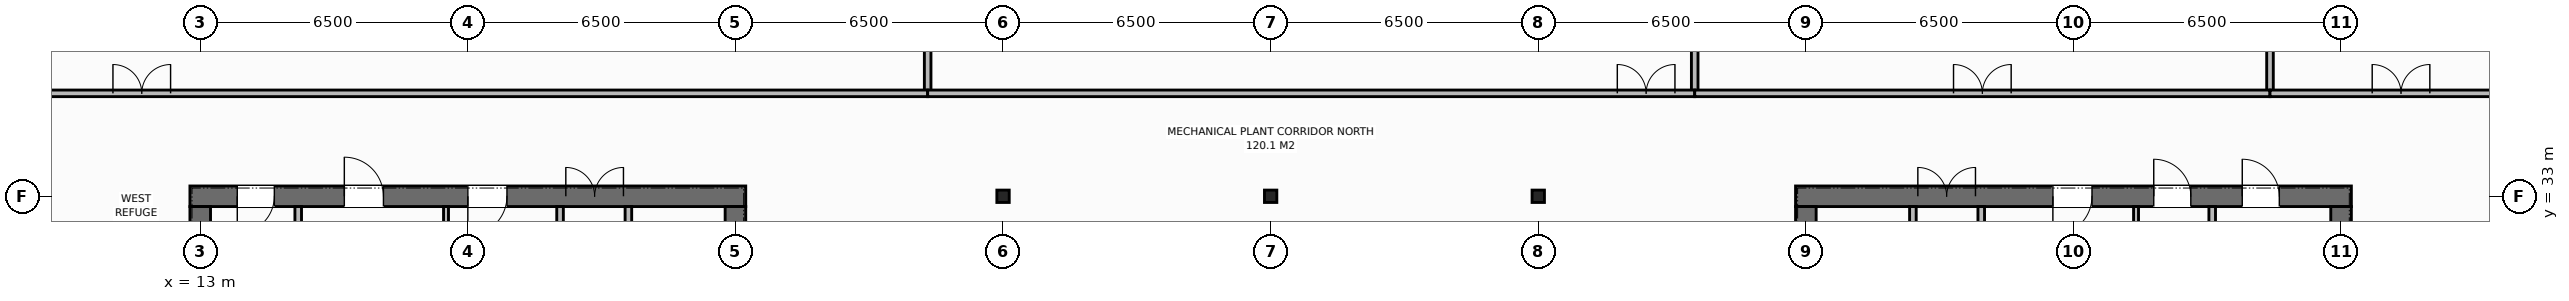
"""IFC4 building model, lengths in metres.
Left out: names, types, materials, properties, quantities, classifications, styles, units other than length and angle.
Written with IfcOpenShell. Run it as: python <this file> out.ifc"""

import sys

from ifc_helpers import new_model, si_unit, direction, frame, frame_2d, origin, origin_2d, place, context, subcontext, project, spatial, rectangle, i_section, extrude, element, fill, save


model = new_model("IFC4")
c1 = context("Model", 3, precision=1e-05, world=origin(), true_north=direction((0.0, 1.0)))
c2 = subcontext(c1, "Body", "Model", "MODEL_VIEW")
j1 = project(units=[si_unit("LENGTHUNIT", "METRE"), si_unit("PLANEANGLEUNIT", "RADIAN")], contexts=[c1])
p1 = place(None, origin())
s1 = spatial("IfcSite", under=j1, at=p1, CompositionType="ELEMENT")
p2 = place(p1, origin())
s2 = spatial("IfcBuilding", under=s1, at=p2, CompositionType="ELEMENT")
p3 = place(p2, frame((0.0, 0.0, 315.4)))
s3 = spatial("IfcBuildingStorey", under=s2, at=p3, CompositionType="ELEMENT", Elevation=315.4)
p4 = place(p3, frame((12.75, 33.0, 0.0), z_axis=(0.0, 0.0, 1.0), x_axis=(1.0, 0.0, 0.0)))
e1 = element("IfcWall", 1, at=p4, inside=s3, PredefinedType="SHEAR", context=c2, shape_type="SweptSolid", body=[
    extrude(rectangle(XDim=13.5, YDim=0.5, at=frame_2d((6.75, 0.0))), origin(), (0.0, 0.0, 1.0), 4.58),
])
p5 = place(p4, frame((1.15, 0.0, 0.0)))
e2 = element("IfcOpeningElement", 2, at=p5, cuts=e1, PredefinedType="OPENING", context=c2, shape_type="SweptSolid", body=[
    extrude(rectangle(XDim=0.9, YDim=2.15, at=frame_2d((0.45, 1.075))), frame((0.0, 0.26, 0.0), z_axis=(0.0, -1.0, 0.0), x_axis=(1.0, 0.0, 0.0)), (0.0, 0.0, 1.0), 0.52),
])
p6 = place(p4, frame((3.75, 0.0, 0.0)))
e3 = element("IfcOpeningElement", 3, at=p6, cuts=e1, PredefinedType="OPENING", context=c2, shape_type="SweptSolid", body=[
    extrude(rectangle(XDim=0.95, YDim=2.15, at=frame_2d((0.475, 1.075))), frame((0.0, 0.26, 0.0), z_axis=(0.0, -1.0, 0.0), x_axis=(1.0, 0.0, 0.0)), (0.0, 0.0, 1.0), 0.52),
])
p7 = place(p4, frame((6.75, 0.0, 0.0)))
e4 = element("IfcOpeningElement", 4, at=p7, cuts=e1, PredefinedType="OPENING", context=c2, shape_type="SweptSolid", body=[
    extrude(rectangle(XDim=0.95, YDim=2.15, at=frame_2d((0.475, 1.075))), frame((0.0, 0.26, 0.0), z_axis=(0.0, -1.0, 0.0), x_axis=(1.0, 0.0, 0.0)), (0.0, 0.0, 1.0), 0.52),
])
p8 = place(p4, frame((9.13, 0.0, 0.0)))
e5 = element("IfcOpeningElement", 5, at=p8, cuts=e1, PredefinedType="OPENING", context=c2, shape_type="SweptSolid", body=[
    extrude(rectangle(XDim=1.4, YDim=2.2, at=frame_2d((0.7, 1.1))), frame((0.0, 0.26, 0.0), z_axis=(0.0, -1.0, 0.0), x_axis=(1.0, 0.0, 0.0)), (0.0, 0.0, 1.0), 0.52),
])
p9 = place(p3, frame((13.0, 19.25, 0.0), z_axis=(0.0, 0.0, 1.0), x_axis=(0.0, 1.0, 0.0)))
e6 = element("IfcWall", 6, at=p9, inside=s3, PredefinedType="SHEAR", context=c2, shape_type="SweptSolid", body=[
    extrude(rectangle(XDim=13.5, YDim=0.5, at=frame_2d((6.75, 0.0))), origin(), (0.0, 0.0, 1.0), 4.58),
])
p10 = place(p9, frame((4.8, 0.0, 0.0)))
e7 = element("IfcOpeningElement", 7, at=p10, cuts=e6, PredefinedType="OPENING", context=c2, shape_type="SweptSolid", body=[
    extrude(rectangle(XDim=1.4, YDim=2.2, at=frame_2d((0.7, 1.1))), frame((0.0, 0.26, 0.0), z_axis=(0.0, -1.0, 0.0), x_axis=(1.0, 0.0, 0.0)), (0.0, 0.0, 1.0), 0.52),
])
p11 = place(p3, frame((26.0, 19.25, 0.0), z_axis=(0.0, 0.0, 1.0), x_axis=(0.0, 1.0, 0.0)))
e8 = element("IfcWall", 8, at=p11, inside=s3, PredefinedType="SHEAR", context=c2, shape_type="SweptSolid", body=[
    extrude(rectangle(XDim=13.5, YDim=0.5, at=frame_2d((6.75, 0.0))), origin(), (0.0, 0.0, 1.0), 4.58),
])
p12 = place(p3, frame((51.75, 33.0, 0.0), z_axis=(0.0, 0.0, 1.0), x_axis=(1.0, 0.0, 0.0)))
e9 = element("IfcWall", 9, at=p12, inside=s3, PredefinedType="SHEAR", context=c2, shape_type="SweptSolid", body=[
    extrude(rectangle(XDim=13.5, YDim=0.5, at=frame_2d((6.75, 0.0))), origin(), (0.0, 0.0, 1.0), 4.58),
])
p13 = place(p12, frame((2.97, 0.0, 0.0)))
e10 = element("IfcOpeningElement", 10, at=p13, cuts=e9, PredefinedType="OPENING", context=c2, shape_type="SweptSolid", body=[
    extrude(rectangle(XDim=1.4, YDim=2.2, at=frame_2d((0.7, 1.1))), frame((0.0, 0.26, 0.0), z_axis=(0.0, -1.0, 0.0), x_axis=(1.0, 0.0, 0.0)), (0.0, 0.0, 1.0), 0.52),
])
p14 = place(p12, frame((10.85, 0.0, 0.0)))
e11 = element("IfcOpeningElement", 11, at=p14, cuts=e9, PredefinedType="OPENING", context=c2, shape_type="SweptSolid", body=[
    extrude(rectangle(XDim=0.9, YDim=2.15, at=frame_2d((0.45, 1.075))), frame((0.0, 0.26, 0.0), z_axis=(0.0, -1.0, 0.0), x_axis=(1.0, 0.0, 0.0)), (0.0, 0.0, 1.0), 0.52),
])
p15 = place(p12, frame((6.25, 0.0, 0.0)))
e12 = element("IfcOpeningElement", 12, at=p15, cuts=e9, PredefinedType="OPENING", context=c2, shape_type="SweptSolid", body=[
    extrude(rectangle(XDim=0.95, YDim=2.15, at=frame_2d((0.475, 1.075))), frame((0.0, 0.26, 0.0), z_axis=(0.0, -1.0, 0.0), x_axis=(1.0, 0.0, 0.0)), (0.0, 0.0, 1.0), 0.52),
])
p16 = place(p12, frame((8.7, 0.0, 0.0)))
e13 = element("IfcOpeningElement", 13, at=p16, cuts=e9, PredefinedType="OPENING", context=c2, shape_type="SweptSolid", body=[
    extrude(rectangle(XDim=0.9, YDim=2.15, at=frame_2d((0.45, 1.075))), frame((0.0, 0.26, 0.0), z_axis=(0.0, -1.0, 0.0), x_axis=(1.0, 0.0, 0.0)), (0.0, 0.0, 1.0), 0.52),
])
p17 = place(p3, frame((52.0, 19.25, 0.0), z_axis=(0.0, 0.0, 1.0), x_axis=(0.0, 1.0, 0.0)))
e14 = element("IfcWall", 14, at=p17, inside=s3, PredefinedType="SHEAR", context=c2, shape_type="SweptSolid", body=[
    extrude(rectangle(XDim=13.5, YDim=0.5, at=frame_2d((6.75, 0.0))), origin(), (0.0, 0.0, 1.0), 4.58),
])
p18 = place(p3, frame((65.0, 19.25, 0.0), z_axis=(0.0, 0.0, 1.0), x_axis=(0.0, 1.0, 0.0)))
e15 = element("IfcWall", 15, at=p18, inside=s3, PredefinedType="SHEAR", context=c2, shape_type="SweptSolid", body=[
    extrude(rectangle(XDim=13.5, YDim=0.5, at=frame_2d((6.75, 0.0))), origin(), (0.0, 0.0, 1.0), 4.58),
])
p19 = place(p18, frame((8.2, 0.0, 0.0)))
e16 = element("IfcOpeningElement", 16, at=p19, cuts=e15, PredefinedType="OPENING", context=c2, shape_type="SweptSolid", body=[
    extrude(rectangle(XDim=1.3, YDim=2.2, at=frame_2d((0.65, 1.1))), frame((0.0, 0.26, 0.0), z_axis=(0.0, -1.0, 0.0), x_axis=(1.0, 0.0, 0.0)), (0.0, 0.0, 1.0), 0.52),
])
for number, where, z_axis, x_axis in (
    (17, (32.5, 33.0, 0.0), (0.0, 0.0, 1.0), (1.0, 0.0, 0.0)),
    (18, (39.0, 33.0, 0.0), (0.0, 0.0, 1.0), (1.0, 0.0, 0.0)),
    (19, (45.5, 33.0, 0.0), (0.0, 0.0, 1.0), (1.0, 0.0, 0.0)),
):
    element("IfcColumn", number, at=place(p3, frame(where, z_axis=z_axis, x_axis=x_axis)), inside=s3, PredefinedType="COLUMN", context=c2, shape_type="SweptSolid", body=[
        extrude(i_section(OverallWidth=0.3, OverallDepth=0.3, WebThickness=0.011, FlangeThickness=0.019, at=origin_2d()), origin(), (0.0, 0.0, 1.0), 5.0),
    ])
p20 = place(p3, frame((15.38, 26.56, 0.0), z_axis=(0.0, 0.0, 1.0), x_axis=(0.0, 1.0, 0.0)))
e20 = element("IfcWall", 20, at=p20, inside=s3, PredefinedType="STANDARD", context=c2, shape_type="SweptSolid", body=[
    extrude(rectangle(XDim=6.19, YDim=0.16, at=frame_2d((3.095, 0.0))), origin(), (0.0, 0.0, 1.0), 4.58),
])
p21 = place(p3, frame((18.97, 26.56, 0.0), z_axis=(0.0, 0.0, 1.0), x_axis=(0.0, 1.0, 0.0)))
e21 = element("IfcWall", 21, at=p21, inside=s3, PredefinedType="PARTITIONING", context=c2, shape_type="SweptSolid", body=[
    extrude(rectangle(XDim=6.19, YDim=0.12, at=frame_2d((3.095, 0.0))), origin(), (0.0, 0.0, 1.0), 4.58),
])
p22 = place(p3, frame((21.74, 26.56, 0.0), z_axis=(0.0, 0.0, 1.0), x_axis=(0.0, 1.0, 0.0)))
e22 = element("IfcWall", 22, at=p22, inside=s3, PredefinedType="STANDARD", context=c2, shape_type="SweptSolid", body=[
    extrude(rectangle(XDim=6.19, YDim=0.16, at=frame_2d((3.095, 0.0))), origin(), (0.0, 0.0, 1.0), 4.58),
])
p23 = place(p3, frame((23.4, 19.25, 0.0), z_axis=(0.0, 0.0, 1.0), x_axis=(0.0, 1.0, 0.0)))
e23 = element("IfcWall", 23, at=p23, inside=s3, PredefinedType="STANDARD", context=c2, shape_type="SweptSolid", body=[
    extrude(rectangle(XDim=13.5, YDim=0.16, at=frame_2d((6.75, 0.0))), origin(), (0.0, 0.0, 1.0), 4.58),
])
p24 = place(p23, frame((2.25, 0.0, 0.0)))
e24 = element("IfcOpeningElement", 24, at=p24, cuts=e23, PredefinedType="OPENING", context=c2, shape_type="SweptSolid", body=[
    extrude(rectangle(XDim=0.95, YDim=2.15, at=frame_2d((0.475, 1.075))), frame((0.0, 0.09, 0.0), z_axis=(0.0, -1.0, 0.0), x_axis=(1.0, 0.0, 0.0)), (0.0, 0.0, 1.0), 0.18),
])
p25 = place(p23, frame((6.35, 0.0, 0.0)))
e25 = element("IfcOpeningElement", 25, at=p25, cuts=e23, PredefinedType="OPENING", context=c2, shape_type="SweptSolid", body=[
    extrude(rectangle(XDim=0.95, YDim=2.15, at=frame_2d((0.475, 1.075))), frame((0.0, 0.09, 0.0), z_axis=(0.0, -1.0, 0.0), x_axis=(1.0, 0.0, 0.0)), (0.0, 0.0, 1.0), 0.18),
])
p26 = place(p23, frame((9.95, 0.0, 0.0)))
e26 = element("IfcOpeningElement", 26, at=p26, cuts=e23, PredefinedType="OPENING", context=c2, shape_type="SweptSolid", body=[
    extrude(rectangle(XDim=0.95, YDim=2.15, at=frame_2d((0.475, 1.075))), frame((0.0, 0.09, 0.0), z_axis=(0.0, -1.0, 0.0), x_axis=(1.0, 0.0, 0.0)), (0.0, 0.0, 1.0), 0.18),
])
p27 = place(p3, frame((54.6, 19.25, 0.0), z_axis=(0.0, 0.0, 1.0), x_axis=(0.0, 1.0, 0.0)))
e27 = element("IfcWall", 27, at=p27, inside=s3, PredefinedType="STANDARD", context=c2, shape_type="SweptSolid", body=[
    extrude(rectangle(XDim=13.5, YDim=0.16, at=frame_2d((6.75, 0.0))), origin(), (0.0, 0.0, 1.0), 4.58),
])
p28 = place(p27, frame((2.15, 0.0, 0.0)))
e28 = element("IfcOpeningElement", 28, at=p28, cuts=e27, PredefinedType="OPENING", context=c2, shape_type="SweptSolid", body=[
    extrude(rectangle(XDim=0.95, YDim=2.15, at=frame_2d((0.475, 1.075))), frame((0.0, 0.09, 0.0), z_axis=(0.0, -1.0, 0.0), x_axis=(1.0, 0.0, 0.0)), (0.0, 0.0, 1.0), 0.18),
])
p29 = place(p27, frame((6.25, 0.0, 0.0)))
e29 = element("IfcOpeningElement", 29, at=p29, cuts=e27, PredefinedType="OPENING", context=c2, shape_type="SweptSolid", body=[
    extrude(rectangle(XDim=0.95, YDim=2.15, at=frame_2d((0.475, 1.075))), frame((0.0, 0.09, 0.0), z_axis=(0.0, -1.0, 0.0), x_axis=(1.0, 0.0, 0.0)), (0.0, 0.0, 1.0), 0.18),
])
p30 = place(p27, frame((9.95, 0.0, 0.0)))
e30 = element("IfcOpeningElement", 30, at=p30, cuts=e27, PredefinedType="OPENING", context=c2, shape_type="SweptSolid", body=[
    extrude(rectangle(XDim=0.95, YDim=2.15, at=frame_2d((0.475, 1.075))), frame((0.0, 0.09, 0.0), z_axis=(0.0, -1.0, 0.0), x_axis=(1.0, 0.0, 0.0)), (0.0, 0.0, 1.0), 0.18),
])
p31 = place(p3, frame((56.26, 23.09, 0.0), z_axis=(0.0, 0.0, 1.0), x_axis=(0.0, 1.0, 0.0)))
e31 = element("IfcWall", 31, at=p31, inside=s3, PredefinedType="STANDARD", context=c2, shape_type="SweptSolid", body=[
    extrude(rectangle(XDim=9.66, YDim=0.16, at=frame_2d((4.83, 0.0))), origin(), (0.0, 0.0, 1.0), 4.58),
])
p32 = place(p31, frame((1.01, 0.0, 0.0)))
e32 = element("IfcOpeningElement", 32, at=p32, cuts=e31, PredefinedType="OPENING", context=c2, shape_type="SweptSolid", body=[
    extrude(rectangle(XDim=1.3, YDim=2.2, at=frame_2d((0.65, 1.1))), frame((0.0, 0.09, 0.0), z_axis=(0.0, -1.0, 0.0), x_axis=(1.0, 0.0, 0.0)), (0.0, 0.0, 1.0), 0.18),
])
p33 = place(p3, frame((61.87, 26.56, 0.0), z_axis=(0.0, 0.0, 1.0), x_axis=(0.0, 1.0, 0.0)))
e33 = element("IfcWall", 33, at=p33, inside=s3, PredefinedType="STANDARD", context=c2, shape_type="SweptSolid", body=[
    extrude(rectangle(XDim=6.19, YDim=0.16, at=frame_2d((3.095, 0.0))), origin(), (0.0, 0.0, 1.0), 4.58),
])
p34 = place(p3, frame((60.02, 26.56, 0.0), z_axis=(0.0, 0.0, 1.0), x_axis=(0.0, 1.0, 0.0)))
e34 = element("IfcWall", 34, at=p34, inside=s3, PredefinedType="PARTITIONING", context=c2, shape_type="SweptSolid", body=[
    extrude(rectangle(XDim=6.19, YDim=0.12, at=frame_2d((3.095, 0.0))), origin(), (0.0, 0.0, 1.0), 4.58),
])
p35 = place(p3, frame((30.669, 35.5, 0.0), z_axis=(0.0, 0.0, 1.0), x_axis=(0.0, 1.0, 0.0)))
e35 = element("IfcWall", 35, at=p35, inside=s3, PredefinedType="STANDARD", context=c2, shape_type="SweptSolid", body=[
    extrude(rectangle(XDim=11.38, YDim=0.16, at=frame_2d((5.69, 0.0))), origin(), (0.0, 0.0, 1.0), 4.58),
])
p36 = place(p3, frame((7.22, 35.5, 0.0), z_axis=(0.0, 0.0, 1.0), x_axis=(1.0, 0.0, 0.0)))
e36 = element("IfcWall", 36, at=p36, inside=s3, PredefinedType="STANDARD", context=c2, shape_type="SweptSolid", body=[
    extrude(rectangle(XDim=23.449, YDim=0.16, at=frame_2d((11.725, 0.0))), origin(), (0.0, 0.0, 1.0), 4.58),
])
p37 = place(p36, frame((3.66, 0.0, 0.0)))
e37 = element("IfcOpeningElement", 37, at=p37, cuts=e36, PredefinedType="OPENING", context=c2, shape_type="SweptSolid", body=[
    extrude(rectangle(XDim=1.4, YDim=2.2, at=frame_2d((0.7, 1.1))), frame((0.0, 0.09, 0.0), z_axis=(0.0, -1.0, 0.0), x_axis=(1.0, 0.0, 0.0)), (0.0, 0.0, 1.0), 0.18),
])
p38 = place(p3, frame((49.3, 35.5, 0.0), z_axis=(0.0, 0.0, 1.0), x_axis=(0.0, 1.0, 0.0)))
e38 = element("IfcWall", 38, at=p38, inside=s3, PredefinedType="STANDARD", context=c2, shape_type="SweptSolid", body=[
    extrude(rectangle(XDim=11.38, YDim=0.16, at=frame_2d((5.69, 0.0))), origin(), (0.0, 0.0, 1.0), 4.58),
])
p39 = place(p3, frame((30.669, 35.5, 0.0), z_axis=(0.0, 0.0, 1.0), x_axis=(1.0, 0.0, 0.0)))
e39 = element("IfcWall", 39, at=p39, inside=s3, PredefinedType="STANDARD", context=c2, shape_type="SweptSolid", body=[
    extrude(rectangle(XDim=18.631, YDim=0.16, at=frame_2d((9.316, 0.0))), origin(), (0.0, 0.0, 1.0), 4.58),
])
p40 = place(p39, frame((16.751, 0.0, 0.0)))
e40 = element("IfcOpeningElement", 40, at=p40, cuts=e39, PredefinedType="OPENING", context=c2, shape_type="SweptSolid", body=[
    extrude(rectangle(XDim=1.4, YDim=2.2, at=frame_2d((0.7, 1.1))), frame((0.0, 0.09, 0.0), z_axis=(0.0, -1.0, 0.0), x_axis=(1.0, 0.0, 0.0)), (0.0, 0.0, 1.0), 0.18),
])
p41 = place(p3, frame((63.274, 35.5, 0.0), z_axis=(0.0, 0.0, 1.0), x_axis=(0.0, 1.0, 0.0)))
e41 = element("IfcWall", 41, at=p41, inside=s3, PredefinedType="STANDARD", context=c2, shape_type="SweptSolid", body=[
    extrude(rectangle(XDim=11.38, YDim=0.16, at=frame_2d((5.69, 0.0))), origin(), (0.0, 0.0, 1.0), 4.58),
])
p42 = place(p3, frame((49.3, 35.5, 0.0), z_axis=(0.0, 0.0, 1.0), x_axis=(1.0, 0.0, 0.0)))
e42 = element("IfcWall", 42, at=p42, inside=s3, PredefinedType="STANDARD", context=c2, shape_type="SweptSolid", body=[
    extrude(rectangle(XDim=13.973, YDim=0.16, at=frame_2d((6.987, 0.0))), origin(), (0.0, 0.0, 1.0), 4.58),
])
p43 = place(p42, frame((6.287, 0.0, 0.0)))
e43 = element("IfcOpeningElement", 43, at=p43, cuts=e42, PredefinedType="OPENING", context=c2, shape_type="SweptSolid", body=[
    extrude(rectangle(XDim=1.4, YDim=2.2, at=frame_2d((0.7, 1.1))), frame((0.0, 0.09, 0.0), z_axis=(0.0, -1.0, 0.0), x_axis=(1.0, 0.0, 0.0)), (0.0, 0.0, 1.0), 0.18),
])
p44 = place(p3, frame((63.274, 35.5, 0.0), z_axis=(0.0, 0.0, 1.0), x_axis=(1.0, 0.0, 0.0)))
e44 = element("IfcWall", 44, at=p44, inside=s3, PredefinedType="STANDARD", context=c2, shape_type="SweptSolid", body=[
    extrude(rectangle(XDim=10.806, YDim=0.16, at=frame_2d((5.403, 0.0))), origin(), (0.0, 0.0, 1.0), 4.58),
])
p45 = place(p44, frame((2.482, 0.0, 0.0)))
e45 = element("IfcOpeningElement", 45, at=p45, cuts=e44, PredefinedType="OPENING", context=c2, shape_type="SweptSolid", body=[
    extrude(rectangle(XDim=1.4, YDim=2.2, at=frame_2d((0.7, 1.1))), frame((0.0, 0.09, 0.0), z_axis=(0.0, -1.0, 0.0), x_axis=(1.0, 0.0, 0.0)), (0.0, 0.0, 1.0), 0.18),
])
p46 = place(p5, origin())
e46 = element("IfcDoor", 46, at=p46, inside=s3, OperationType="SINGLE_SWING_RIGHT", PredefinedType="DOOR", context=c2, shape_type="SweptSolid", body=[
    extrude(rectangle(XDim=0.9, YDim=2.15, at=frame_2d((0.45, 1.075))), frame((0.0, -0.025, 0.0), z_axis=(0.0, -1.0, 0.0), x_axis=(1.0, 0.0, 0.0)), (0.0, 0.0, 1.0), 0.05),
])
fill(e2, e46)
p47 = place(p6, origin())
e47 = element("IfcDoor", 47, at=p47, inside=s3, OperationType="SINGLE_SWING_LEFT", PredefinedType="DOOR", context=c2, shape_type="SweptSolid", body=[
    extrude(rectangle(XDim=0.95, YDim=2.15, at=frame_2d((0.475, 1.075))), frame((0.0, -0.025, 0.0), z_axis=(0.0, -1.0, 0.0), x_axis=(1.0, 0.0, 0.0)), (0.0, 0.0, 1.0), 0.05),
])
fill(e3, e47)
p48 = place(p7, origin())
e48 = element("IfcDoor", 48, at=p48, inside=s3, OperationType="SINGLE_SWING_RIGHT", PredefinedType="DOOR", context=c2, shape_type="SweptSolid", body=[
    extrude(rectangle(XDim=0.95, YDim=2.15, at=frame_2d((0.475, 1.075))), frame((0.0, -0.025, 0.0), z_axis=(0.0, -1.0, 0.0), x_axis=(1.0, 0.0, 0.0)), (0.0, 0.0, 1.0), 0.05),
])
fill(e4, e48)
p49 = place(p8, origin())
e49 = element("IfcDoor", 49, at=p49, inside=s3, OperationType="DOUBLE_DOOR_SINGLE_SWING", PredefinedType="DOOR", context=c2, shape_type="SweptSolid", body=[
    extrude(rectangle(XDim=1.4, YDim=2.2, at=frame_2d((0.7, 1.1))), frame((0.0, -0.025, 0.0), z_axis=(0.0, -1.0, 0.0), x_axis=(1.0, 0.0, 0.0)), (0.0, 0.0, 1.0), 0.05),
])
fill(e5, e49)
p50 = place(p13, origin())
e50 = element("IfcDoor", 50, at=p50, inside=s3, OperationType="DOUBLE_DOOR_SINGLE_SWING", PredefinedType="DOOR", context=c2, shape_type="SweptSolid", body=[
    extrude(rectangle(XDim=1.4, YDim=2.2, at=frame_2d((0.7, 1.1))), frame((0.0, -0.025, 0.0), z_axis=(0.0, -1.0, 0.0), x_axis=(1.0, 0.0, 0.0)), (0.0, 0.0, 1.0), 0.05),
])
fill(e10, e50)
p51 = place(p14, origin())
e51 = element("IfcDoor", 51, at=p51, inside=s3, OperationType="SINGLE_SWING_LEFT", PredefinedType="DOOR", context=c2, shape_type="SweptSolid", body=[
    extrude(rectangle(XDim=0.9, YDim=2.15, at=frame_2d((0.45, 1.075))), frame((0.0, -0.025, 0.0), z_axis=(0.0, -1.0, 0.0), x_axis=(1.0, 0.0, 0.0)), (0.0, 0.0, 1.0), 0.05),
])
fill(e11, e51)
p52 = place(p15, origin())
e52 = element("IfcDoor", 52, at=p52, inside=s3, OperationType="SINGLE_SWING_RIGHT", PredefinedType="DOOR", context=c2, shape_type="SweptSolid", body=[
    extrude(rectangle(XDim=0.95, YDim=2.15, at=frame_2d((0.475, 1.075))), frame((0.0, -0.025, 0.0), z_axis=(0.0, -1.0, 0.0), x_axis=(1.0, 0.0, 0.0)), (0.0, 0.0, 1.0), 0.05),
])
fill(e12, e52)
p53 = place(p16, origin())
e53 = element("IfcDoor", 53, at=p53, inside=s3, OperationType="SINGLE_SWING_LEFT", PredefinedType="DOOR", context=c2, shape_type="SweptSolid", body=[
    extrude(rectangle(XDim=0.9, YDim=2.15, at=frame_2d((0.45, 1.075))), frame((0.0, -0.025, 0.0), z_axis=(0.0, -1.0, 0.0), x_axis=(1.0, 0.0, 0.0)), (0.0, 0.0, 1.0), 0.05),
])
fill(e13, e53)
p54 = place(p37, origin())
e54 = element("IfcDoor", 54, at=p54, inside=s3, OperationType="DOUBLE_DOOR_SINGLE_SWING", PredefinedType="DOOR", context=c2, shape_type="SweptSolid", body=[
    extrude(rectangle(XDim=1.4, YDim=2.2, at=frame_2d((0.7, 1.1))), frame((0.0, 0.025, 0.0), z_axis=(0.0, -1.0, 0.0), x_axis=(1.0, 0.0, 0.0)), (0.0, 0.0, 1.0), 0.05),
])
fill(e37, e54)
p55 = place(p40, origin())
e55 = element("IfcDoor", 55, at=p55, inside=s3, OperationType="DOUBLE_DOOR_SINGLE_SWING", PredefinedType="DOOR", context=c2, shape_type="SweptSolid", body=[
    extrude(rectangle(XDim=1.4, YDim=2.2, at=frame_2d((0.7, 1.1))), frame((0.0, 0.025, 0.0), z_axis=(0.0, -1.0, 0.0), x_axis=(1.0, 0.0, 0.0)), (0.0, 0.0, 1.0), 0.05),
])
fill(e40, e55)
p56 = place(p43, origin())
e56 = element("IfcDoor", 56, at=p56, inside=s3, OperationType="DOUBLE_DOOR_SINGLE_SWING", PredefinedType="DOOR", context=c2, shape_type="SweptSolid", body=[
    extrude(rectangle(XDim=1.4, YDim=2.2, at=frame_2d((0.7, 1.1))), frame((0.0, 0.025, 0.0), z_axis=(0.0, -1.0, 0.0), x_axis=(1.0, 0.0, 0.0)), (0.0, 0.0, 1.0), 0.05),
])
fill(e43, e56)
p57 = place(p45, origin())
e57 = element("IfcDoor", 57, at=p57, inside=s3, OperationType="DOUBLE_DOOR_SINGLE_SWING", PredefinedType="DOOR", context=c2, shape_type="SweptSolid", body=[
    extrude(rectangle(XDim=1.4, YDim=2.2, at=frame_2d((0.7, 1.1))), frame((0.0, 0.025, 0.0), z_axis=(0.0, -1.0, 0.0), x_axis=(1.0, 0.0, 0.0)), (0.0, 0.0, 1.0), 0.05),
])
fill(e45, e57)
save(model, sys.argv[1])
